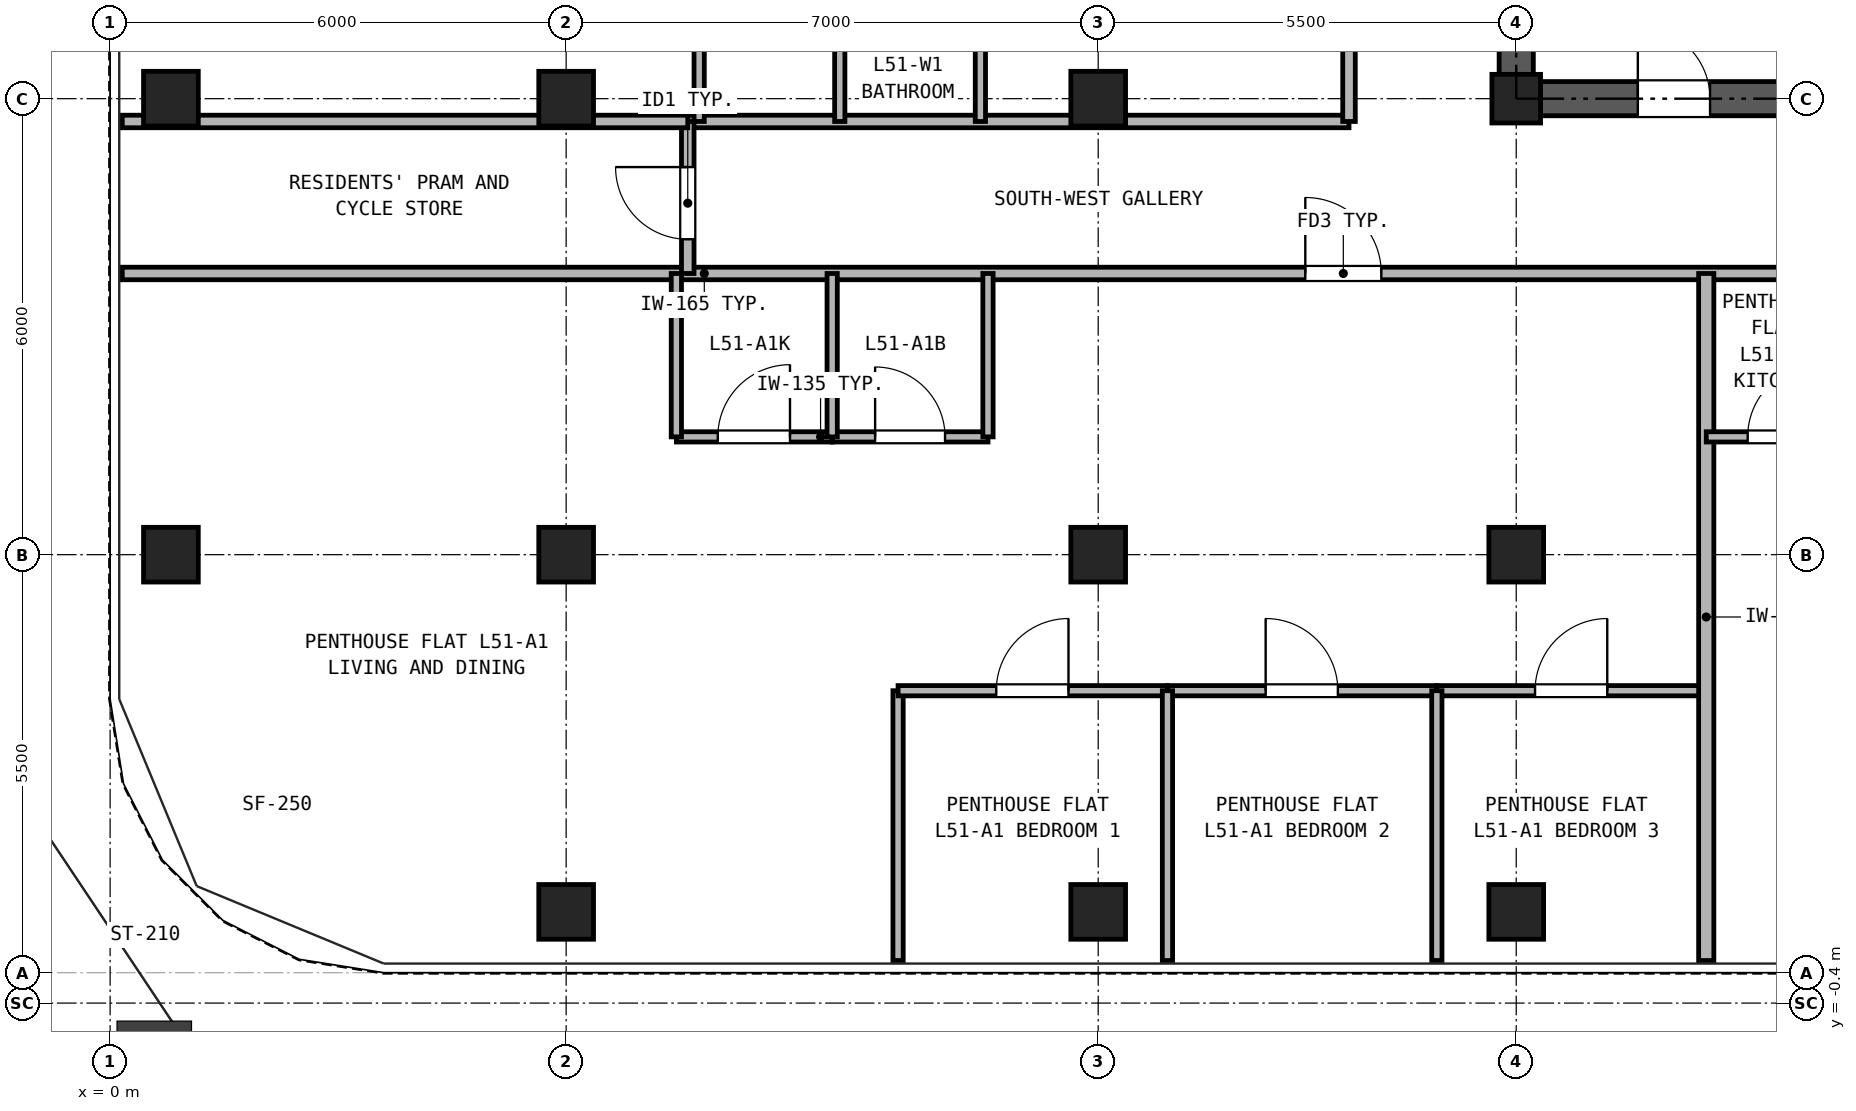
"""IFC4 building model, lengths in metres.
Left out: names, types, materials, properties, quantities, classifications, styles, units other than length and angle.
Written with IfcOpenShell. Run it as: python <this file> out.ifc"""

import sys

from ifc_helpers import new_model, si_unit, direction, frame, frame_2d, origin, origin_2d, place, context, subcontext, project, spatial, rectangle, hollow_rectangle, extrude, source, transform, mapped, element, fill, save


model = new_model("IFC4")
c1 = context("Model", 3, precision=1e-05, world=origin(), true_north=direction((0.0, 1.0)))
c2 = subcontext(c1, "Body", "Model", "MODEL_VIEW")
j1 = project(units=[si_unit("LENGTHUNIT", "METRE"), si_unit("PLANEANGLEUNIT", "RADIAN")], contexts=[c1])
p1 = place(None, origin())
s1 = spatial("IfcSite", under=j1, at=p1, CompositionType="ELEMENT")
p2 = place(p1, origin())
s2 = spatial("IfcBuilding", under=s1, at=p2, CompositionType="ELEMENT")
p3 = place(p2, frame((0.0, 0.0, 181.7)))
s3 = spatial("IfcBuildingStorey", under=s2, at=p3, CompositionType="ELEMENT", Elevation=181.7)
m1 = source(origin(), c2, "Body", "SweptSolid", [
    extrude(hollow_rectangle(XDim=0.72, YDim=0.72, WallThickness=0.04, at=origin_2d()), origin(), (0.0, 0.0, 1.0), 2.95),
])
for number, where, z_axis, x_axis in (
    (1, (6.0, 0.8, 0.0), (0.0, 0.0, 1.0), (1.0, 0.0, 0.0)),
    (2, (13.0, 0.8, 0.0), (0.0, 0.0, 1.0), (1.0, 0.0, 0.0)),
    (3, (18.5, 0.8, 0.0), (0.0, 0.0, 1.0), (1.0, 0.0, 0.0)),
    (4, (0.8, 5.5, 0.0), (0.0, 0.0, 1.0), (1.0, 0.0, 0.0)),
    (5, (0.8, 11.5, 0.0), (0.0, 0.0, 1.0), (1.0, 0.0, 0.0)),
    (6, (6.0, 5.5, 0.0), (0.0, 0.0, 1.0), (1.0, 0.0, 0.0)),
    (7, (6.0, 11.5, 0.0), (0.0, 0.0, 1.0), (1.0, 0.0, 0.0)),
    (8, (13.0, 5.5, 0.0), (0.0, 0.0, 1.0), (1.0, 0.0, 0.0)),
    (9, (13.0, 11.5, 0.0), (0.0, 0.0, 1.0), (1.0, 0.0, 0.0)),
    (10, (18.5, 5.5, 0.0), (0.0, 0.0, 1.0), (1.0, 0.0, 0.0)),
):
    element("IfcColumn", number, at=place(p3, frame(where, z_axis=z_axis, x_axis=x_axis)), inside=s3, PredefinedType="COLUMN", context=c2, shape_type="MappedRepresentation", body=[
        mapped(m1, transform((0.0, 0.0, 0.0), x_axis=(1.0, 0.0, 0.0), y_axis=(0.0, 1.0, 0.0), z_axis=(0.0, 0.0, 1.0), scale=1.0)),
    ])
m2 = source(origin(), c2, "Body", "SweptSolid", [
    extrude(hollow_rectangle(XDim=0.64, YDim=0.64, WallThickness=0.035, at=origin_2d()), origin(), (0.0, 0.0, 1.0), 2.95),
])
p4 = place(p3, frame((18.5, 11.5, 0.0), z_axis=(0.0, 0.0, 1.0), x_axis=(1.0, 0.0, 0.0)))
e11 = element("IfcColumn", 11, at=p4, inside=s3, PredefinedType="COLUMN", context=c2, shape_type="MappedRepresentation", body=[
    mapped(m2, transform((0.0, 0.0, 0.0), x_axis=(1.0, 0.0, 0.0), y_axis=(0.0, 1.0, 0.0), z_axis=(0.0, 0.0, 1.0), scale=1.0)),
])
p5 = place(p3, frame((18.275, 11.5, 0.0), z_axis=(0.0, 0.0, 1.0), x_axis=(1.0, 0.0, 0.0)))
e12 = element("IfcWall", 12, at=p5, inside=s3, PredefinedType="SHEAR", context=c2, shape_type="SweptSolid", body=[
    extrude(rectangle(XDim=10.45, YDim=0.45, at=frame_2d((5.225, 0.0))), origin(), (0.0, 0.0, 1.0), 2.95),
])
p6 = place(p5, frame((1.825, 0.0, 0.0)))
e13 = element("IfcOpeningElement", 13, at=p6, cuts=e12, PredefinedType="OPENING", context=c2, shape_type="SweptSolid", body=[
    extrude(rectangle(XDim=0.95, YDim=2.15, at=frame_2d((0.475, 1.075))), frame((0.0, 0.235, 0.0), z_axis=(0.0, -1.0, 0.0), x_axis=(1.0, 0.0, 0.0)), (0.0, 0.0, 1.0), 0.47),
])
p7 = place(p5, frame((5.325, 0.0, 0.0)))
e14 = element("IfcOpeningElement", 14, at=p7, cuts=e12, PredefinedType="OPENING", context=c2, shape_type="SweptSolid", body=[
    extrude(rectangle(XDim=0.95, YDim=2.15, at=frame_2d((0.475, 1.075))), frame((0.0, 0.235, 0.0), z_axis=(0.0, -1.0, 0.0), x_axis=(1.0, 0.0, 0.0)), (0.0, 0.0, 1.0), 0.47),
])
p8 = place(p5, frame((8.225, 0.0, 0.0)))
e15 = element("IfcOpeningElement", 15, at=p8, cuts=e12, PredefinedType="OPENING", context=c2, shape_type="SweptSolid", body=[
    extrude(rectangle(XDim=1.1, YDim=2.25, at=frame_2d((0.55, 1.125))), frame((0.0, 0.235, 0.0), z_axis=(0.0, -1.0, 0.0), x_axis=(1.0, 0.0, 0.0)), (0.0, 0.0, 1.0), 0.47),
])
p9 = place(p3, frame((18.5, 11.725, 0.0), z_axis=(0.0, 0.0, 1.0), x_axis=(0.0, 1.0, 0.0)))
e16 = element("IfcWall", 16, at=p9, inside=s3, PredefinedType="SHEAR", context=c2, shape_type="SweptSolid", body=[
    extrude(rectangle(XDim=16.8, YDim=0.45, at=frame_2d((8.4, 0.0))), origin(), (0.0, 0.0, 1.0), 2.95),
])
p10 = place(p9, frame((7.425, 0.0, 0.0)))
e17 = element("IfcOpeningElement", 17, at=p10, cuts=e16, PredefinedType="OPENING", context=c2, shape_type="SweptSolid", body=[
    extrude(rectangle(XDim=1.15, YDim=2.2, at=frame_2d((0.575, 1.1))), frame((0.0, 0.235, 0.0), z_axis=(0.0, -1.0, 0.0), x_axis=(1.0, 0.0, 0.0)), (0.0, 0.0, 1.0), 0.47),
])
p11 = place(p3, frame((0.16, 9.2, 0.0), z_axis=(0.0, 0.0, 1.0), x_axis=(1.0, 0.0, 0.0)))
e18 = element("IfcWall", 18, at=p11, inside=s3, PredefinedType="PARTITIONING", context=c2, shape_type="SweptSolid", body=[
    extrude(rectangle(XDim=41.48, YDim=0.165, at=frame_2d((20.74, 0.0))), origin(), (0.0, 0.0, 1.0), 2.95),
])
p12 = place(p11, frame((15.565, 0.0, 0.0)))
e19 = element("IfcOpeningElement", 19, at=p12, cuts=e18, PredefinedType="OPENING", context=c2, shape_type="SweptSolid", body=[
    extrude(rectangle(XDim=1.0, YDim=2.15, at=frame_2d((0.5, 1.075))), frame((0.0, 0.093, 0.0), z_axis=(0.0, -1.0, 0.0), x_axis=(1.0, 0.0, 0.0)), (0.0, 0.0, 1.0), 0.185),
])
p13 = place(p11, frame((30.94, 0.0, 0.0)))
e20 = element("IfcOpeningElement", 20, at=p13, cuts=e18, PredefinedType="OPENING", context=c2, shape_type="SweptSolid", body=[
    extrude(rectangle(XDim=1.0, YDim=2.15, at=frame_2d((0.5, 1.075))), frame((0.0, 0.093, 0.0), z_axis=(0.0, -1.0, 0.0), x_axis=(1.0, 0.0, 0.0)), (0.0, 0.0, 1.0), 0.185),
])
p14 = place(p3, frame((7.6, 11.2, 0.0), z_axis=(0.0, 0.0, 1.0), x_axis=(1.0, 0.0, 0.0)))
e21 = element("IfcWall", 21, at=p14, inside=s3, PredefinedType="PARTITIONING", context=c2, shape_type="SweptSolid", body=[
    extrude(rectangle(XDim=8.7, YDim=0.165, at=frame_2d((4.35, 0.0))), origin(), (0.0, 0.0, 1.0), 2.95),
])
p15 = place(p3, frame((7.6, 9.2, 0.0), z_axis=(0.0, 0.0, 1.0), x_axis=(0.0, 1.0, 0.0)))
e22 = element("IfcWall", 22, at=p15, inside=s3, PredefinedType="PARTITIONING", context=c2, shape_type="SweptSolid", body=[
    extrude(rectangle(XDim=2.0, YDim=0.165, at=frame_2d((1.0, 0.0))), origin(), (0.0, 0.0, 1.0), 2.95),
])
p16 = place(p15, frame((0.45, 0.0, 0.0)))
e23 = element("IfcOpeningElement", 23, at=p16, cuts=e22, PredefinedType="OPENING", context=c2, shape_type="SweptSolid", body=[
    extrude(rectangle(XDim=0.95, YDim=2.15, at=frame_2d((0.475, 1.075))), frame((0.0, 0.093, 0.0), z_axis=(0.0, -1.0, 0.0), x_axis=(1.0, 0.0, 0.0)), (0.0, 0.0, 1.0), 0.185),
])
p17 = place(p3, frame((16.3, 11.2, 0.0), z_axis=(0.0, 0.0, 1.0), x_axis=(0.0, 1.0, 0.0)))
e24 = element("IfcWall", 24, at=p17, inside=s3, PredefinedType="PARTITIONING", context=c2, shape_type="SweptSolid", body=[
    extrude(rectangle(XDim=23.94, YDim=0.165, at=frame_2d((11.97, 0.0))), origin(), (0.0, 0.0, 1.0), 2.95),
])
p18 = place(p17, frame((5.4, 0.0, 0.0)))
e25 = element("IfcOpeningElement", 25, at=p18, cuts=e24, PredefinedType="OPENING", context=c2, shape_type="SweptSolid", body=[
    extrude(rectangle(XDim=1.0, YDim=2.15, at=frame_2d((0.5, 1.075))), frame((0.0, 0.093, 0.0), z_axis=(0.0, -1.0, 0.0), x_axis=(1.0, 0.0, 0.0)), (0.0, 0.0, 1.0), 0.185),
])
p19 = place(p17, frame((14.95, 0.0, 0.0)))
e26 = element("IfcOpeningElement", 26, at=p19, cuts=e24, PredefinedType="OPENING", context=c2, shape_type="SweptSolid", body=[
    extrude(rectangle(XDim=1.0, YDim=2.15, at=frame_2d((0.5, 1.075))), frame((0.0, 0.093, 0.0), z_axis=(0.0, -1.0, 0.0), x_axis=(1.0, 0.0, 0.0)), (0.0, 0.0, 1.0), 0.185),
])
p20 = place(p3, frame((7.45, 7.05, 0.0), z_axis=(0.0, 0.0, 1.0), x_axis=(1.0, 0.0, 0.0)))
e27 = element("IfcWall", 27, at=p20, inside=s3, PredefinedType="PARTITIONING", context=c2, shape_type="SweptSolid", body=[
    extrude(rectangle(XDim=2.05, YDim=0.135, at=frame_2d((1.025, 0.0))), origin(), (0.0, 0.0, 1.0), 2.95),
])
p21 = place(p20, frame((0.545, 0.0, 0.0)))
e28 = element("IfcOpeningElement", 28, at=p21, cuts=e27, PredefinedType="OPENING", context=c2, shape_type="SweptSolid", body=[
    extrude(rectangle(XDim=0.95, YDim=2.15, at=frame_2d((0.475, 1.075))), frame((0.0, 0.077, 0.0), z_axis=(0.0, -1.0, 0.0), x_axis=(1.0, 0.0, 0.0)), (0.0, 0.0, 1.0), 0.155),
])
p22 = place(p3, frame((9.5, 7.05, 0.0), z_axis=(0.0, 0.0, 1.0), x_axis=(1.0, 0.0, 0.0)))
e29 = element("IfcWall", 29, at=p22, inside=s3, PredefinedType="PARTITIONING", context=c2, shape_type="SweptSolid", body=[
    extrude(rectangle(XDim=2.05, YDim=0.135, at=frame_2d((1.025, 0.0))), origin(), (0.0, 0.0, 1.0), 2.95),
])
p23 = place(p22, frame((0.565, 0.0, 0.0)))
e30 = element("IfcOpeningElement", 30, at=p23, cuts=e29, PredefinedType="OPENING", context=c2, shape_type="SweptSolid", body=[
    extrude(rectangle(XDim=0.92, YDim=2.1, at=frame_2d((0.46, 1.05))), frame((0.0, 0.077, 0.0), z_axis=(0.0, -1.0, 0.0), x_axis=(1.0, 0.0, 0.0)), (0.0, 0.0, 1.0), 0.155),
])
for number, where, z_axis, x_axis in (
    (31, (7.45, 7.05, 0.0), (0.0, 0.0, 1.0), (0.0, 1.0, 0.0)),
    (32, (9.5, 7.05, 0.0), (0.0, 0.0, 1.0), (0.0, 1.0, 0.0)),
    (33, (11.55, 7.05, 0.0), (0.0, 0.0, 1.0), (0.0, 1.0, 0.0)),
):
    element("IfcWall", number, at=place(p3, frame(where, z_axis=z_axis, x_axis=x_axis)), inside=s3, PredefinedType="PARTITIONING", context=c2, shape_type="SweptSolid", body=[
        extrude(rectangle(XDim=2.15, YDim=0.135, at=frame_2d((1.075, 0.0))), origin(), (0.0, 0.0, 1.0), 2.95),
    ])
p24 = place(p3, frame((10.367, 0.16, 0.0), z_axis=(0.0, 0.0, 1.0), x_axis=(0.0, 1.0, 0.0)))
e34 = element("IfcWall", 34, at=p24, inside=s3, PredefinedType="PARTITIONING", context=c2, shape_type="SweptSolid", body=[
    extrude(rectangle(XDim=3.55, YDim=0.135, at=frame_2d((1.775, 0.0))), origin(), (0.0, 0.0, 1.0), 2.95),
])
p25 = place(p3, frame((10.367, 3.71, 0.0), z_axis=(0.0, 0.0, 1.0), x_axis=(1.0, 0.0, 0.0)))
e35 = element("IfcWall", 35, at=p25, inside=s3, PredefinedType="PARTITIONING", context=c2, shape_type="SweptSolid", body=[
    extrude(rectangle(XDim=3.544, YDim=0.135, at=frame_2d((1.772, 0.0))), origin(), (0.0, 0.0, 1.0), 2.95),
])
p26 = place(p25, frame((1.292, 0.0, 0.0)))
e36 = element("IfcOpeningElement", 36, at=p26, cuts=e35, PredefinedType="OPENING", context=c2, shape_type="SweptSolid", body=[
    extrude(rectangle(XDim=0.95, YDim=2.15, at=frame_2d((0.475, 1.075))), frame((0.0, 0.077, 0.0), z_axis=(0.0, -1.0, 0.0), x_axis=(1.0, 0.0, 0.0)), (0.0, 0.0, 1.0), 0.155),
])
p27 = place(p3, frame((13.911, 3.71, 0.0), z_axis=(0.0, 0.0, 1.0), x_axis=(1.0, 0.0, 0.0)))
e37 = element("IfcWall", 37, at=p27, inside=s3, PredefinedType="PARTITIONING", context=c2, shape_type="SweptSolid", body=[
    extrude(rectangle(XDim=3.544, YDim=0.135, at=frame_2d((1.772, 0.0))), origin(), (0.0, 0.0, 1.0), 2.95),
])
p28 = place(p27, frame((1.292, 0.0, 0.0)))
e38 = element("IfcOpeningElement", 38, at=p28, cuts=e37, PredefinedType="OPENING", context=c2, shape_type="SweptSolid", body=[
    extrude(rectangle(XDim=0.95, YDim=2.15, at=frame_2d((0.475, 1.075))), frame((0.0, 0.077, 0.0), z_axis=(0.0, -1.0, 0.0), x_axis=(1.0, 0.0, 0.0)), (0.0, 0.0, 1.0), 0.155),
])
p29 = place(p3, frame((13.911, 0.16, 0.0), z_axis=(0.0, 0.0, 1.0), x_axis=(0.0, 1.0, 0.0)))
e39 = element("IfcWall", 39, at=p29, inside=s3, PredefinedType="PARTITIONING", context=c2, shape_type="SweptSolid", body=[
    extrude(rectangle(XDim=3.55, YDim=0.135, at=frame_2d((1.775, 0.0))), origin(), (0.0, 0.0, 1.0), 2.95),
])
p30 = place(p3, frame((17.456, 3.71, 0.0), z_axis=(0.0, 0.0, 1.0), x_axis=(1.0, 0.0, 0.0)))
e40 = element("IfcWall", 40, at=p30, inside=s3, PredefinedType="PARTITIONING", context=c2, shape_type="SweptSolid", body=[
    extrude(rectangle(XDim=3.544, YDim=0.135, at=frame_2d((1.772, 0.0))), origin(), (0.0, 0.0, 1.0), 2.95),
])
p31 = place(p30, frame((1.292, 0.0, 0.0)))
e41 = element("IfcOpeningElement", 41, at=p31, cuts=e40, PredefinedType="OPENING", context=c2, shape_type="SweptSolid", body=[
    extrude(rectangle(XDim=0.95, YDim=2.15, at=frame_2d((0.475, 1.075))), frame((0.0, 0.077, 0.0), z_axis=(0.0, -1.0, 0.0), x_axis=(1.0, 0.0, 0.0)), (0.0, 0.0, 1.0), 0.155),
])
p32 = place(p3, frame((17.456, 0.16, 0.0), z_axis=(0.0, 0.0, 1.0), x_axis=(0.0, 1.0, 0.0)))
e42 = element("IfcWall", 42, at=p32, inside=s3, PredefinedType="PARTITIONING", context=c2, shape_type="SweptSolid", body=[
    extrude(rectangle(XDim=3.55, YDim=0.135, at=frame_2d((1.775, 0.0))), origin(), (0.0, 0.0, 1.0), 2.95),
])
p33 = place(p3, frame((21.0, 0.16, 0.0), z_axis=(0.0, 0.0, 1.0), x_axis=(0.0, 1.0, 0.0)))
e43 = element("IfcWall", 43, at=p33, inside=s3, PredefinedType="PARTITIONING", context=c2, shape_type="SweptSolid", body=[
    extrude(rectangle(XDim=9.04, YDim=0.2, at=frame_2d((4.52, 0.0))), origin(), (0.0, 0.0, 1.0), 2.95),
])
p34 = place(p3, frame((21.0, 7.05, 0.0), z_axis=(0.0, 0.0, 1.0), x_axis=(1.0, 0.0, 0.0)))
e44 = element("IfcWall", 44, at=p34, inside=s3, PredefinedType="PARTITIONING", context=c2, shape_type="SweptSolid", body=[
    extrude(rectangle(XDim=2.05, YDim=0.135, at=frame_2d((1.025, 0.0))), origin(), (0.0, 0.0, 1.0), 2.95),
])
p35 = place(p34, frame((0.545, 0.0, 0.0)))
e45 = element("IfcOpeningElement", 45, at=p35, cuts=e44, PredefinedType="OPENING", context=c2, shape_type="SweptSolid", body=[
    extrude(rectangle(XDim=0.95, YDim=2.15, at=frame_2d((0.475, 1.075))), frame((0.0, 0.077, 0.0), z_axis=(0.0, -1.0, 0.0), x_axis=(1.0, 0.0, 0.0)), (0.0, 0.0, 1.0), 0.155),
])
p36 = place(p3, frame((0.16, 11.2, 0.0), z_axis=(0.0, 0.0, 1.0), x_axis=(1.0, 0.0, 0.0)))
e46 = element("IfcWall", 46, at=p36, inside=s3, PredefinedType="PARTITIONING", context=c2, shape_type="SweptSolid", body=[
    extrude(rectangle(XDim=7.44, YDim=0.165, at=frame_2d((3.72, 0.0))), origin(), (0.0, 0.0, 1.0), 2.95),
])
for number, where, z_axis, x_axis in (
    (47, (7.75, 11.2, 0.0), (0.0, 0.0, 1.0), (0.0, 1.0, 0.0)),
    (48, (9.6, 11.2, 0.0), (0.0, 0.0, 1.0), (0.0, 1.0, 0.0)),
    (49, (11.45, 11.2, 0.0), (0.0, 0.0, 1.0), (0.0, 1.0, 0.0)),
):
    element("IfcWall", number, at=place(p3, frame(where, z_axis=z_axis, x_axis=x_axis)), inside=s3, PredefinedType="PARTITIONING", context=c2, shape_type="SweptSolid", body=[
        extrude(rectangle(XDim=2.15, YDim=0.135, at=frame_2d((1.075, 0.0))), origin(), (0.0, 0.0, 1.0), 2.95),
    ])
p37 = place(p6, frame((0.95, 0.0, 0.0), z_axis=(0.0, 0.0, 1.0), x_axis=(-1.0, 0.0, 0.0)))
e50 = element("IfcDoor", 50, at=p37, inside=s3, OperationType="SINGLE_SWING_LEFT", PredefinedType="DOOR", context=c2, shape_type="SweptSolid", body=[
    extrude(rectangle(XDim=0.95, YDim=2.15, at=frame_2d((0.475, 1.075))), frame((0.0, 0.025, 0.0), z_axis=(0.0, -1.0, 0.0), x_axis=(1.0, 0.0, 0.0)), (0.0, 0.0, 1.0), 0.05),
])
fill(e13, e50)
p38 = place(p21, origin())
e51 = element("IfcDoor", 51, at=p38, inside=s3, OperationType="SINGLE_SWING_RIGHT", PredefinedType="DOOR", context=c2, shape_type="SweptSolid", body=[
    extrude(rectangle(XDim=0.95, YDim=2.15, at=frame_2d((0.475, 1.075))), frame((0.0, 0.025, 0.0), z_axis=(0.0, -1.0, 0.0), x_axis=(1.0, 0.0, 0.0)), (0.0, 0.0, 1.0), 0.05),
])
fill(e28, e51)
p39 = place(p23, origin())
e52 = element("IfcDoor", 52, at=p39, inside=s3, OperationType="SINGLE_SWING_LEFT", PredefinedType="DOOR", context=c2, shape_type="SweptSolid", body=[
    extrude(rectangle(XDim=0.92, YDim=2.1, at=frame_2d((0.46, 1.05))), frame((0.0, 0.025, 0.0), z_axis=(0.0, -1.0, 0.0), x_axis=(1.0, 0.0, 0.0)), (0.0, 0.0, 1.0), 0.05),
])
fill(e30, e52)
p40 = place(p26, frame((0.95, 0.0, 0.0), z_axis=(0.0, 0.0, 1.0), x_axis=(-1.0, 0.0, 0.0)))
e53 = element("IfcDoor", 53, at=p40, inside=s3, OperationType="SINGLE_SWING_RIGHT", PredefinedType="DOOR", context=c2, shape_type="SweptSolid", body=[
    extrude(rectangle(XDim=0.95, YDim=2.15, at=frame_2d((0.475, 1.075))), frame((0.0, 0.025, 0.0), z_axis=(0.0, -1.0, 0.0), x_axis=(1.0, 0.0, 0.0)), (0.0, 0.0, 1.0), 0.05),
])
fill(e36, e53)
p41 = place(p28, frame((0.95, 0.0, 0.0), z_axis=(0.0, 0.0, 1.0), x_axis=(-1.0, 0.0, 0.0)))
e54 = element("IfcDoor", 54, at=p41, inside=s3, OperationType="SINGLE_SWING_LEFT", PredefinedType="DOOR", context=c2, shape_type="SweptSolid", body=[
    extrude(rectangle(XDim=0.95, YDim=2.15, at=frame_2d((0.475, 1.075))), frame((0.0, 0.025, 0.0), z_axis=(0.0, -1.0, 0.0), x_axis=(1.0, 0.0, 0.0)), (0.0, 0.0, 1.0), 0.05),
])
fill(e38, e54)
p42 = place(p31, frame((0.95, 0.0, 0.0), z_axis=(0.0, 0.0, 1.0), x_axis=(-1.0, 0.0, 0.0)))
e55 = element("IfcDoor", 55, at=p42, inside=s3, OperationType="SINGLE_SWING_RIGHT", PredefinedType="DOOR", context=c2, shape_type="SweptSolid", body=[
    extrude(rectangle(XDim=0.95, YDim=2.15, at=frame_2d((0.475, 1.075))), frame((0.0, 0.025, 0.0), z_axis=(0.0, -1.0, 0.0), x_axis=(1.0, 0.0, 0.0)), (0.0, 0.0, 1.0), 0.05),
])
fill(e41, e55)
p43 = place(p12, frame((1.0, 0.0, 0.0), z_axis=(0.0, 0.0, 1.0), x_axis=(-1.0, 0.0, 0.0)))
e56 = element("IfcDoor", 56, at=p43, inside=s3, OperationType="SINGLE_SWING_LEFT", PredefinedType="DOOR", context=c2, shape_type="SweptSolid", body=[
    extrude(rectangle(XDim=1.0, YDim=2.15, at=frame_2d((0.5, 1.075))), frame((0.0, 0.025, 0.0), z_axis=(0.0, -1.0, 0.0), x_axis=(1.0, 0.0, 0.0)), (0.0, 0.0, 1.0), 0.05),
])
fill(e19, e56)
p44 = place(p35, origin())
e57 = element("IfcDoor", 57, at=p44, inside=s3, OperationType="SINGLE_SWING_RIGHT", PredefinedType="DOOR", context=c2, shape_type="SweptSolid", body=[
    extrude(rectangle(XDim=0.95, YDim=2.15, at=frame_2d((0.475, 1.075))), frame((0.0, 0.025, 0.0), z_axis=(0.0, -1.0, 0.0), x_axis=(1.0, 0.0, 0.0)), (0.0, 0.0, 1.0), 0.05),
])
fill(e45, e57)
p45 = place(p16, frame((0.95, 0.0, 0.0), z_axis=(0.0, 0.0, 1.0), x_axis=(-1.0, 0.0, 0.0)))
e58 = element("IfcDoor", 58, at=p45, inside=s3, OperationType="SINGLE_SWING_RIGHT", PredefinedType="DOOR", context=c2, shape_type="SweptSolid", body=[
    extrude(rectangle(XDim=0.95, YDim=2.15, at=frame_2d((0.475, 1.075))), frame((0.0, 0.025, 0.0), z_axis=(0.0, -1.0, 0.0), x_axis=(1.0, 0.0, 0.0)), (0.0, 0.0, 1.0), 0.05),
])
fill(e23, e58)
save(model, sys.argv[1])
